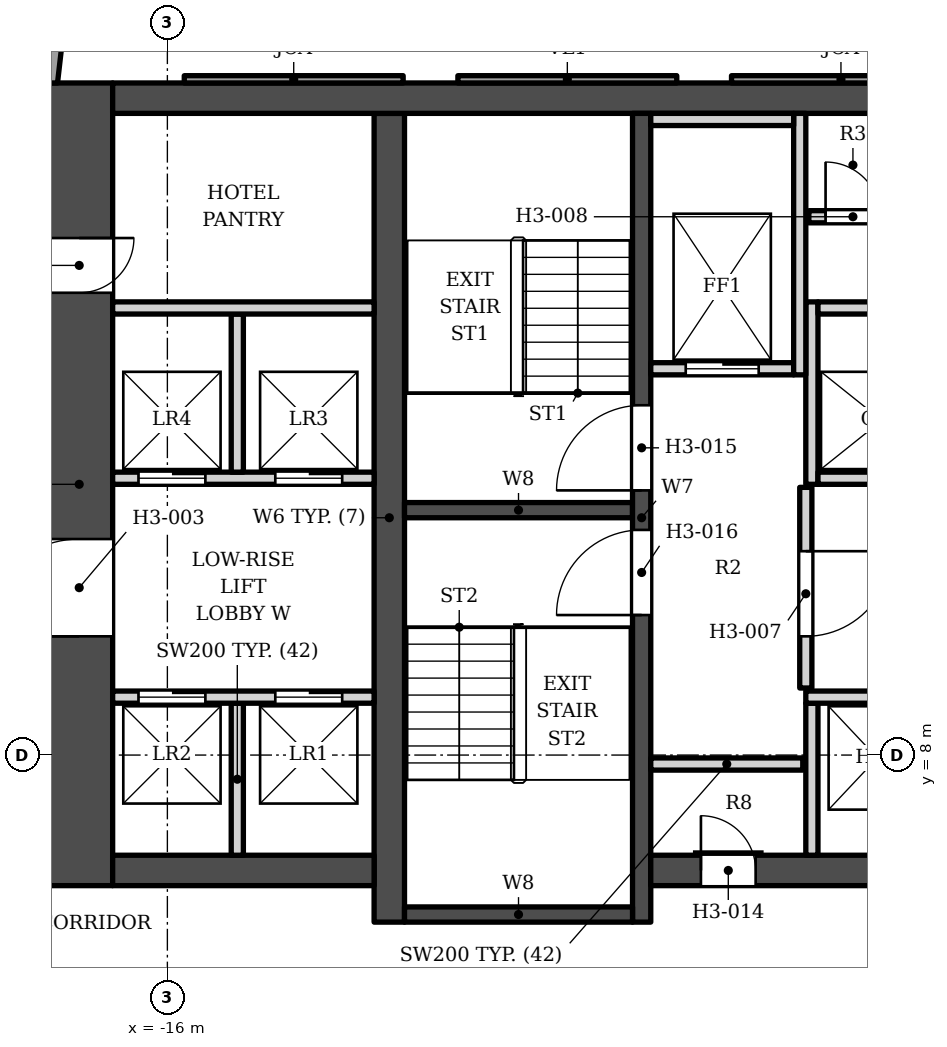
"""IFC4 building model, lengths in metres.
Left out: names, types, materials, properties, quantities, classifications, styles, units other than length and angle.
Written with IfcOpenShell. Run it as: python <this file> out.ifc"""

import sys

from ifc_helpers import new_model, si_unit, direction, frame, frame_2d, origin, place, context, subcontext, project, spatial, polyline, rectangle, outline, extrude, element, fill, save


model = new_model("IFC4")
c1 = context("Model", 3, precision=1e-05, world=origin(), true_north=direction((0.0, 1.0)))
c2 = subcontext(c1, "Body", "Model", "MODEL_VIEW")
j1 = project(units=[si_unit("LENGTHUNIT", "METRE"), si_unit("PLANEANGLEUNIT", "RADIAN")], contexts=[c1])
p1 = place(None, origin())
s1 = spatial("IfcSite", under=j1, at=p1, CompositionType="ELEMENT")
p2 = place(p1, origin())
s2 = spatial("IfcBuilding", under=s1, at=p2, CompositionType="ELEMENT")
p3 = place(p2, frame((0.0, 0.0, 66.4)))
s3 = spatial("IfcBuildingStorey", under=s2, at=p3, CompositionType="ELEMENT", Elevation=66.4)
p4 = place(p3, frame((-16.9, 18.802, 0.0), z_axis=(0.0, 0.0, 1.0), x_axis=(1.0, 0.0, 0.0)))
e1 = element("IfcWall", 1, at=p4, inside=s3, PredefinedType="SHEAR", context=c2, shape_type="SweptSolid", body=[
    extrude(rectangle(XDim=33.8, YDim=0.5, at=frame_2d((16.9, 0.0))), origin(), (0.0, 0.0, 1.0), 3.4),
])
p5 = place(p3, frame((-12.35, 5.253, 0.0), z_axis=(0.0, 0.0, 1.0), x_axis=(0.0, 1.0, 0.0)))
e2 = element("IfcWall", 2, at=p5, inside=s3, PredefinedType="SHEAR", context=c2, shape_type="SweptSolid", body=[
    extrude(rectangle(XDim=13.3, YDim=0.5, at=frame_2d((6.65, 0.0))), origin(), (0.0, 0.0, 1.0), 3.4),
])
p6 = place(p3, frame((-8.2, 5.253, 0.0), z_axis=(0.0, 0.0, 1.0), x_axis=(0.0, 1.0, 0.0)))
e3 = element("IfcWall", 3, at=p6, inside=s3, PredefinedType="SHEAR", context=c2, shape_type="SweptSolid", body=[
    extrude(rectangle(XDim=13.3, YDim=0.3, at=frame_2d((6.65, 0.0))), origin(), (0.0, 0.0, 1.0), 3.4),
])
p7 = place(p6, frame((7.1, 0.0, 0.0)))
e4 = element("IfcOpeningElement", 4, at=p7, cuts=e3, PredefinedType="OPENING", context=c2, shape_type="SweptSolid", body=[
    extrude(rectangle(XDim=1.4, YDim=2.1, at=frame_2d((0.7, 1.05))), frame((0.0, 0.16, 0.0), z_axis=(0.0, -1.0, 0.0), x_axis=(1.0, 0.0, 0.0)), (0.0, 0.0, 1.0), 0.32),
])
p8 = place(p6, frame((5.05, 0.0, 0.0)))
e5 = element("IfcOpeningElement", 5, at=p8, cuts=e3, PredefinedType="OPENING", context=c2, shape_type="SweptSolid", body=[
    extrude(rectangle(XDim=1.4, YDim=2.1, at=frame_2d((0.7, 1.05))), frame((0.0, 0.16, 0.0), z_axis=(0.0, -1.0, 0.0), x_axis=(1.0, 0.0, 0.0)), (0.0, 0.0, 1.0), 0.32),
])
for number, where, z_axis, x_axis in (
    (6, (-12.1, 12.028, 0.0), (0.0, 0.0, 1.0), (1.0, 0.0, 0.0)),
    (7, (-12.1, 5.378, 0.0), (0.0, 0.0, 1.0), (1.0, 0.0, 0.0)),
):
    element("IfcWall", number, at=place(p3, frame(where, z_axis=z_axis, x_axis=x_axis)), inside=s3, PredefinedType="SHEAR", context=c2, shape_type="SweptSolid", body=[
        extrude(rectangle(XDim=3.75, YDim=0.25, at=frame_2d((1.875, 0.0))), origin(), (0.0, 0.0, 1.0), 3.4),
    ])
p9 = place(p3, frame((-8.05, 6.103, 0.0), z_axis=(0.0, 0.0, 1.0), x_axis=(1.0, 0.0, 0.0)))
e8 = element("IfcWall", 8, at=p9, inside=s3, PredefinedType="SHEAR", context=c2, shape_type="SweptSolid", body=[
    extrude(rectangle(XDim=7.05, YDim=0.5, at=frame_2d((3.525, 0.0))), origin(), (0.0, 0.0, 1.0), 3.4),
])
p10 = place(p9, frame((0.825, 0.0, 0.0)))
e9 = element("IfcOpeningElement", 9, at=p10, cuts=e8, PredefinedType="OPENING", context=c2, shape_type="SweptSolid", body=[
    extrude(rectangle(XDim=0.9, YDim=2.1, at=frame_2d((0.45, 1.05))), frame((0.0, 0.26, 0.0), z_axis=(0.0, -1.0, 0.0), x_axis=(1.0, 0.0, 0.0)), (0.0, 0.0, 1.0), 0.52),
])
p11 = place(p3, frame((-12.6, 6.103, 0.0), z_axis=(0.0, 0.0, 1.0), x_axis=(-1.0, 0.0, 0.0)))
e10 = element("IfcWall", 10, at=p11, inside=s3, PredefinedType="SHEAR", context=c2, shape_type="SweptSolid", body=[
    extrude(rectangle(XDim=4.3, YDim=0.5, at=frame_2d((2.15, 0.0))), origin(), (0.0, 0.0, 1.0), 3.4),
])
p12 = place(p3, frame((-17.45, 5.853, 0.0), z_axis=(0.0, 0.0, 1.0), x_axis=(0.0, 1.0, 0.0)))
e11 = element("IfcWall", 11, at=p12, inside=s3, PredefinedType="SHEAR", context=c2, shape_type="SweptSolid", body=[
    extrude(rectangle(XDim=13.2, YDim=1.1, at=frame_2d((6.6, 0.0))), origin(), (0.0, 0.0, 1.0), 3.4),
])
p13 = place(p12, frame((4.1, 0.0, 0.0)))
e12 = element("IfcOpeningElement", 12, at=p13, cuts=e11, PredefinedType="OPENING", context=c2, shape_type="SweptSolid", body=[
    extrude(rectangle(XDim=1.6, YDim=2.1, at=frame_2d((0.8, 1.05))), frame((0.0, 0.56, 0.0), z_axis=(0.0, -1.0, 0.0), x_axis=(1.0, 0.0, 0.0)), (0.0, 0.0, 1.0), 1.12),
])
p14 = place(p12, frame((9.75, 0.0, 0.0)))
e13 = element("IfcOpeningElement", 13, at=p14, cuts=e11, PredefinedType="OPENING", context=c2, shape_type="SweptSolid", body=[
    extrude(rectangle(XDim=0.9, YDim=2.1, at=frame_2d((0.45, 1.05))), frame((0.0, 0.56, 0.0), z_axis=(0.0, -1.0, 0.0), x_axis=(1.0, 0.0, 0.0)), (0.0, 0.0, 1.0), 1.12),
])
p15 = place(p3, origin())
e14 = element("IfcWall", 14, at=p15, inside=s3, PredefinedType="SOLIDWALL", context=c2, shape_type="SweptSolid", body=[
    extrude(outline(polyline([(-6.722, 19.173), (-6.722, 19.052), (-3.122, 19.052), (-3.122, 19.173), (-6.722, 19.173)])), origin(), (0.0, 0.0, 1.0), 2.65),
])
p16 = place(p3, origin())
e15 = element("IfcWall", 15, at=p16, inside=s3, PredefinedType="ELEMENTEDWALL", context=c2, shape_type="SweptSolid", body=[
    extrude(outline(polyline([(-11.222, 19.173), (-11.222, 19.052), (-7.622, 19.052), (-7.622, 19.173), (-11.222, 19.173)])), origin(), (0.0, 0.0, 1.0), 2.65),
])
p17 = place(p3, origin())
e16 = element("IfcWall", 16, at=p17, inside=s3, PredefinedType="SOLIDWALL", context=c2, shape_type="SweptSolid", body=[
    extrude(outline(polyline([(-15.722, 19.173), (-15.722, 19.052), (-12.122, 19.052), (-12.122, 19.173), (-15.722, 19.173)])), origin(), (0.0, 0.0, 1.0), 2.65),
])
p18 = place(p3, origin())
e17 = element("IfcWall", 17, at=p18, inside=s3, PredefinedType="SOLIDWALL", context=c2, shape_type="SweptSolid", body=[
    extrude(outline(polyline([(-20.658, 19.983), (-20.795, 18.791), (-18.0, 18.471), (-18.0, 19.052), (-17.807, 19.052), (-17.739, 19.649), (-20.658, 19.983)])), origin(), (0.0, 0.0, 1.0), 2.65),
])
for number, where, z_axis, x_axis in (
    (18, (-14.85, 6.353, 0.0), (0.0, 0.0, 1.0), (0.0, 1.0, 0.0)),
    (19, (-5.4, 6.353, 0.0), (0.0, 0.0, 1.0), (0.0, 1.0, 0.0)),
    (20, (-8.05, 7.853, 0.0), (0.0, 0.0, 1.0), (1.0, 0.0, 0.0)),
):
    element("IfcWall", number, at=place(p3, frame(where, z_axis=z_axis, x_axis=x_axis)), inside=s3, PredefinedType="SOLIDWALL", context=c2, shape_type="SweptSolid", body=[
        extrude(rectangle(XDim=2.5, YDim=0.2, at=frame_2d((1.25, 0.0))), origin(), (0.0, 0.0, 1.0), 3.23),
    ])
p19 = place(p3, frame((-16.9, 8.953, 0.0), z_axis=(0.0, 0.0, 1.0), x_axis=(1.0, 0.0, 0.0)))
e21 = element("IfcWall", 21, at=p19, inside=s3, PredefinedType="SOLIDWALL", context=c2, shape_type="SweptSolid", body=[
    extrude(rectangle(XDim=4.3, YDim=0.2, at=frame_2d((2.15, 0.0))), origin(), (0.0, 0.0, 1.0), 3.23),
])
p20 = place(p19, frame((2.675, 0.0, 0.0)))
e22 = element("IfcOpeningElement", 22, at=p20, cuts=e21, PredefinedType="OPENING", context=c2, shape_type="SweptSolid", body=[
    extrude(rectangle(XDim=1.1, YDim=2.1, at=frame_2d((0.55, 1.05))), frame((0.0, 0.11, 0.0), z_axis=(0.0, -1.0, 0.0), x_axis=(1.0, 0.0, 0.0)), (0.0, 0.0, 1.0), 0.22),
])
p21 = place(p19, frame((0.425, 0.0, 0.0)))
e23 = element("IfcOpeningElement", 23, at=p21, cuts=e21, PredefinedType="OPENING", context=c2, shape_type="SweptSolid", body=[
    extrude(rectangle(XDim=1.1, YDim=2.1, at=frame_2d((0.55, 1.05))), frame((0.0, 0.11, 0.0), z_axis=(0.0, -1.0, 0.0), x_axis=(1.0, 0.0, 0.0)), (0.0, 0.0, 1.0), 0.22),
])
p22 = place(p3, frame((-5.5, 8.953, 0.0), z_axis=(0.0, 0.0, 1.0), x_axis=(1.0, 0.0, 0.0)))
e24 = element("IfcWall", 24, at=p22, inside=s3, PredefinedType="SOLIDWALL", context=c2, shape_type="SweptSolid", body=[
    extrude(rectangle(XDim=4.5, YDim=0.2, at=frame_2d((2.25, 0.0))), origin(), (0.0, 0.0, 1.0), 3.23),
])
p23 = place(p3, frame((-5.5, 9.103, 0.0), z_axis=(0.0, 0.0, 1.0), x_axis=(0.0, 1.0, 0.0)))
e25 = element("IfcWall", 25, at=p23, inside=s3, PredefinedType="SOLIDWALL", context=c2, shape_type="SweptSolid", body=[
    extrude(rectangle(XDim=3.3, YDim=0.2, at=frame_2d((1.65, 0.0))), origin(), (0.0, 0.0, 1.0), 3.23),
])
p24 = place(p23, frame((0.85, 0.0, 0.0)))
e26 = element("IfcOpeningElement", 26, at=p24, cuts=e25, PredefinedType="OPENING", context=c2, shape_type="SweptSolid", body=[
    extrude(rectangle(XDim=1.4, YDim=2.1, at=frame_2d((0.7, 1.05))), frame((0.0, 0.11, 0.0), z_axis=(0.0, -1.0, 0.0), x_axis=(1.0, 0.0, 0.0)), (0.0, 0.0, 1.0), 0.22),
])
p25 = place(p3, frame((-16.9, 12.552, 0.0), z_axis=(0.0, 0.0, 1.0), x_axis=(1.0, 0.0, 0.0)))
e27 = element("IfcWall", 27, at=p25, inside=s3, PredefinedType="SOLIDWALL", context=c2, shape_type="SweptSolid", body=[
    extrude(rectangle(XDim=4.3, YDim=0.2, at=frame_2d((2.15, 0.0))), origin(), (0.0, 0.0, 1.0), 3.23),
])
p26 = place(p25, frame((2.675, 0.0, 0.0)))
e28 = element("IfcOpeningElement", 28, at=p26, cuts=e27, PredefinedType="OPENING", context=c2, shape_type="SweptSolid", body=[
    extrude(rectangle(XDim=1.1, YDim=2.1, at=frame_2d((0.55, 1.05))), frame((0.0, 0.11, 0.0), z_axis=(0.0, -1.0, 0.0), x_axis=(1.0, 0.0, 0.0)), (0.0, 0.0, 1.0), 0.22),
])
p27 = place(p25, frame((0.425, 0.0, 0.0)))
e29 = element("IfcOpeningElement", 29, at=p27, cuts=e27, PredefinedType="OPENING", context=c2, shape_type="SweptSolid", body=[
    extrude(rectangle(XDim=1.1, YDim=2.1, at=frame_2d((0.55, 1.05))), frame((0.0, 0.11, 0.0), z_axis=(0.0, -1.0, 0.0), x_axis=(1.0, 0.0, 0.0)), (0.0, 0.0, 1.0), 0.22),
])
p28 = place(p3, frame((-5.4, 12.453, 0.0), z_axis=(0.0, 0.0, 1.0), x_axis=(0.0, 1.0, 0.0)))
e30 = element("IfcWall", 30, at=p28, inside=s3, PredefinedType="SOLIDWALL", context=c2, shape_type="SweptSolid", body=[
    extrude(rectangle(XDim=3.0, YDim=0.2, at=frame_2d((1.5, 0.0))), origin(), (0.0, 0.0, 1.0), 3.23),
])
p29 = place(p3, frame((-5.3, 12.552, 0.0), z_axis=(0.0, 0.0, 1.0), x_axis=(1.0, 0.0, 0.0)))
e31 = element("IfcWall", 31, at=p29, inside=s3, PredefinedType="SOLIDWALL", context=c2, shape_type="SweptSolid", body=[
    extrude(rectangle(XDim=2.1, YDim=0.2, at=frame_2d((1.05, 0.0))), origin(), (0.0, 0.0, 1.0), 3.23),
])
p30 = place(p3, frame((-14.85, 12.653, 0.0), z_axis=(0.0, 0.0, 1.0), x_axis=(0.0, 1.0, 0.0)))
e32 = element("IfcWall", 32, at=p30, inside=s3, PredefinedType="SOLIDWALL", context=c2, shape_type="SweptSolid", body=[
    extrude(rectangle(XDim=2.6, YDim=0.2, at=frame_2d((1.3, 0.0))), origin(), (0.0, 0.0, 1.0), 3.23),
])
p31 = place(p3, frame((-8.05, 14.353, 0.0), z_axis=(0.0, 0.0, 1.0), x_axis=(1.0, 0.0, 0.0)))
e33 = element("IfcWall", 33, at=p31, inside=s3, PredefinedType="SOLIDWALL", context=c2, shape_type="SweptSolid", body=[
    extrude(rectangle(XDim=2.35, YDim=0.2, at=frame_2d((1.175, 0.0))), origin(), (0.0, 0.0, 1.0), 3.23),
])
p32 = place(p31, frame((0.575, 0.0, 0.0)))
e34 = element("IfcOpeningElement", 34, at=p32, cuts=e33, PredefinedType="OPENING", context=c2, shape_type="SweptSolid", body=[
    extrude(rectangle(XDim=1.2, YDim=2.1, at=frame_2d((0.6, 1.05))), frame((0.0, 0.11, 0.0), z_axis=(0.0, -1.0, 0.0), x_axis=(1.0, 0.0, 0.0)), (0.0, 0.0, 1.0), 0.22),
])
for number, where, z_axis, x_axis in (
    (35, (-5.6, 14.253, 0.0), (0.0, 0.0, 1.0), (0.0, 1.0, 0.0)),
    (36, (-16.9, 15.353, 0.0), (0.0, 0.0, 1.0), (1.0, 0.0, 0.0)),
):
    element("IfcWall", number, at=place(p3, frame(where, z_axis=z_axis, x_axis=x_axis)), inside=s3, PredefinedType="SOLIDWALL", context=c2, shape_type="SweptSolid", body=[
        extrude(rectangle(XDim=4.3, YDim=0.2, at=frame_2d((2.15, 0.0))), origin(), (0.0, 0.0, 1.0), 3.23),
    ])
p33 = place(p3, frame((-5.3, 15.353, 0.0), z_axis=(0.0, 0.0, 1.0), x_axis=(1.0, 0.0, 0.0)))
e37 = element("IfcWall", 37, at=p33, inside=s3, PredefinedType="SOLIDWALL", context=c2, shape_type="SweptSolid", body=[
    extrude(rectangle(XDim=2.1, YDim=0.2, at=frame_2d((1.05, 0.0))), origin(), (0.0, 0.0, 1.0), 3.23),
])
p34 = place(p3, frame((-5.45, 16.853, 0.0), z_axis=(0.0, 0.0, 1.0), x_axis=(1.0, 0.0, 0.0)))
e38 = element("IfcWall", 38, at=p34, inside=s3, PredefinedType="SOLIDWALL", context=c2, shape_type="SweptSolid", body=[
    extrude(rectangle(XDim=2.55, YDim=0.2, at=frame_2d((1.275, 0.0))), origin(), (0.0, 0.0, 1.0), 3.23),
])
p35 = place(p34, frame((0.275, 0.0, 0.0)))
e39 = element("IfcOpeningElement", 39, at=p35, cuts=e38, PredefinedType="OPENING", context=c2, shape_type="SweptSolid", body=[
    extrude(rectangle(XDim=0.9, YDim=2.1, at=frame_2d((0.45, 1.05))), frame((0.0, 0.11, 0.0), z_axis=(0.0, -1.0, 0.0), x_axis=(1.0, 0.0, 0.0)), (0.0, 0.0, 1.0), 0.22),
])
p36 = place(p34, frame((1.525, 0.0, 0.0)))
e40 = element("IfcOpeningElement", 40, at=p36, cuts=e38, PredefinedType="OPENING", context=c2, shape_type="SweptSolid", body=[
    extrude(rectangle(XDim=0.9, YDim=2.1, at=frame_2d((0.45, 1.05))), frame((0.0, 0.11, 0.0), z_axis=(0.0, -1.0, 0.0), x_axis=(1.0, 0.0, 0.0)), (0.0, 0.0, 1.0), 0.22),
])
p37 = place(p3, frame((-8.05, 18.453, 0.0), z_axis=(0.0, 0.0, 1.0), x_axis=(1.0, 0.0, 0.0)))
e41 = element("IfcWall", 41, at=p37, inside=s3, PredefinedType="SOLIDWALL", context=c2, shape_type="SweptSolid", body=[
    extrude(rectangle(XDim=2.35, YDim=0.2, at=frame_2d((1.175, 0.0))), origin(), (0.0, 0.0, 1.0), 3.23),
])
p38 = place(p32, origin())
e42 = element("IfcDoor", 42, at=p38, inside=s3, OperationType="DOUBLE_DOOR_SLIDING", PredefinedType="DOOR", context=c2, shape_type="SweptSolid", body=[
    extrude(rectangle(XDim=1.2, YDim=2.1, at=frame_2d((0.6, 1.05))), frame((0.0, 0.025, 0.0), z_axis=(0.0, -1.0, 0.0), x_axis=(1.0, 0.0, 0.0)), (0.0, 0.0, 1.0), 0.05),
])
fill(e34, e42)
p39 = place(p20, origin())
e43 = element("IfcDoor", 43, at=p39, inside=s3, OperationType="DOUBLE_DOOR_SLIDING", PredefinedType="DOOR", context=c2, shape_type="SweptSolid", body=[
    extrude(rectangle(XDim=1.1, YDim=2.1, at=frame_2d((0.55, 1.05))), frame((0.0, 0.025, 0.0), z_axis=(0.0, -1.0, 0.0), x_axis=(1.0, 0.0, 0.0)), (0.0, 0.0, 1.0), 0.05),
])
fill(e22, e43)
p40 = place(p26, origin())
e44 = element("IfcDoor", 44, at=p40, inside=s3, OperationType="DOUBLE_DOOR_SLIDING", PredefinedType="DOOR", context=c2, shape_type="SweptSolid", body=[
    extrude(rectangle(XDim=1.1, YDim=2.1, at=frame_2d((0.55, 1.05))), frame((0.0, 0.025, 0.0), z_axis=(0.0, -1.0, 0.0), x_axis=(1.0, 0.0, 0.0)), (0.0, 0.0, 1.0), 0.05),
])
fill(e28, e44)
p41 = place(p21, origin())
e45 = element("IfcDoor", 45, at=p41, inside=s3, OperationType="DOUBLE_DOOR_SLIDING", PredefinedType="DOOR", context=c2, shape_type="SweptSolid", body=[
    extrude(rectangle(XDim=1.1, YDim=2.1, at=frame_2d((0.55, 1.05))), frame((0.0, 0.025, 0.0), z_axis=(0.0, -1.0, 0.0), x_axis=(1.0, 0.0, 0.0)), (0.0, 0.0, 1.0), 0.05),
])
fill(e23, e45)
p42 = place(p27, origin())
e46 = element("IfcDoor", 46, at=p42, inside=s3, OperationType="DOUBLE_DOOR_SLIDING", PredefinedType="DOOR", context=c2, shape_type="SweptSolid", body=[
    extrude(rectangle(XDim=1.1, YDim=2.1, at=frame_2d((0.55, 1.05))), frame((0.0, 0.025, 0.0), z_axis=(0.0, -1.0, 0.0), x_axis=(1.0, 0.0, 0.0)), (0.0, 0.0, 1.0), 0.05),
])
fill(e29, e46)
p43 = place(p7, origin())
e47 = element("IfcDoor", 47, at=p43, inside=s3, OperationType="SINGLE_SWING_LEFT", PredefinedType="DOOR", context=c2, shape_type="SweptSolid", body=[
    extrude(rectangle(XDim=1.4, YDim=2.1, at=frame_2d((0.7, 1.05))), frame((0.0, 0.025, 0.0), z_axis=(0.0, -1.0, 0.0), x_axis=(1.0, 0.0, 0.0)), (0.0, 0.0, 1.0), 0.05),
])
fill(e4, e47)
p44 = place(p8, origin())
e48 = element("IfcDoor", 48, at=p44, inside=s3, OperationType="SINGLE_SWING_LEFT", PredefinedType="DOOR", context=c2, shape_type="SweptSolid", body=[
    extrude(rectangle(XDim=1.4, YDim=2.1, at=frame_2d((0.7, 1.05))), frame((0.0, 0.025, 0.0), z_axis=(0.0, -1.0, 0.0), x_axis=(1.0, 0.0, 0.0)), (0.0, 0.0, 1.0), 0.05),
])
fill(e5, e48)
p45 = place(p24, origin())
e49 = element("IfcDoor", 49, at=p45, inside=s3, OperationType="SINGLE_SWING_RIGHT", PredefinedType="DOOR", context=c2, shape_type="SweptSolid", body=[
    extrude(rectangle(XDim=1.4, YDim=2.1, at=frame_2d((0.7, 1.05))), frame((0.0, 0.025, 0.0), z_axis=(0.0, -1.0, 0.0), x_axis=(1.0, 0.0, 0.0)), (0.0, 0.0, 1.0), 0.05),
])
fill(e26, e49)
p46 = place(p35, origin())
e50 = element("IfcDoor", 50, at=p46, inside=s3, OperationType="SINGLE_SWING_LEFT", PredefinedType="DOOR", context=c2, shape_type="SweptSolid", body=[
    extrude(rectangle(XDim=0.9, YDim=2.1, at=frame_2d((0.45, 1.05))), frame((0.0, 0.025, 0.0), z_axis=(0.0, -1.0, 0.0), x_axis=(1.0, 0.0, 0.0)), (0.0, 0.0, 1.0), 0.05),
])
fill(e39, e50)
p47 = place(p10, origin())
e51 = element("IfcDoor", 51, at=p47, inside=s3, OperationType="SINGLE_SWING_LEFT", PredefinedType="DOOR", context=c2, shape_type="SweptSolid", body=[
    extrude(rectangle(XDim=0.9, YDim=2.1, at=frame_2d((0.45, 1.05))), frame((0.0, 0.025, 0.0), z_axis=(0.0, -1.0, 0.0), x_axis=(1.0, 0.0, 0.0)), (0.0, 0.0, 1.0), 0.05),
])
fill(e9, e51)
p48 = place(p13, origin())
e52 = element("IfcDoor", 52, at=p48, inside=s3, OperationType="DOUBLE_DOOR_SINGLE_SWING", PredefinedType="DOOR", context=c2, shape_type="SweptSolid", body=[
    extrude(rectangle(XDim=1.6, YDim=2.1, at=frame_2d((0.8, 1.05))), frame((0.0, -0.225, 0.0), z_axis=(0.0, -1.0, 0.0), x_axis=(1.0, 0.0, 0.0)), (0.0, 0.0, 1.0), 0.05),
])
fill(e12, e52)
p49 = place(p14, origin())
e53 = element("IfcDoor", 53, at=p49, inside=s3, OperationType="SINGLE_SWING_RIGHT", PredefinedType="DOOR", context=c2, shape_type="SweptSolid", body=[
    extrude(rectangle(XDim=0.9, YDim=2.1, at=frame_2d((0.45, 1.05))), frame((0.0, -0.225, 0.0), z_axis=(0.0, -1.0, 0.0), x_axis=(1.0, 0.0, 0.0)), (0.0, 0.0, 1.0), 0.05),
])
fill(e13, e53)
save(model, sys.argv[1])
